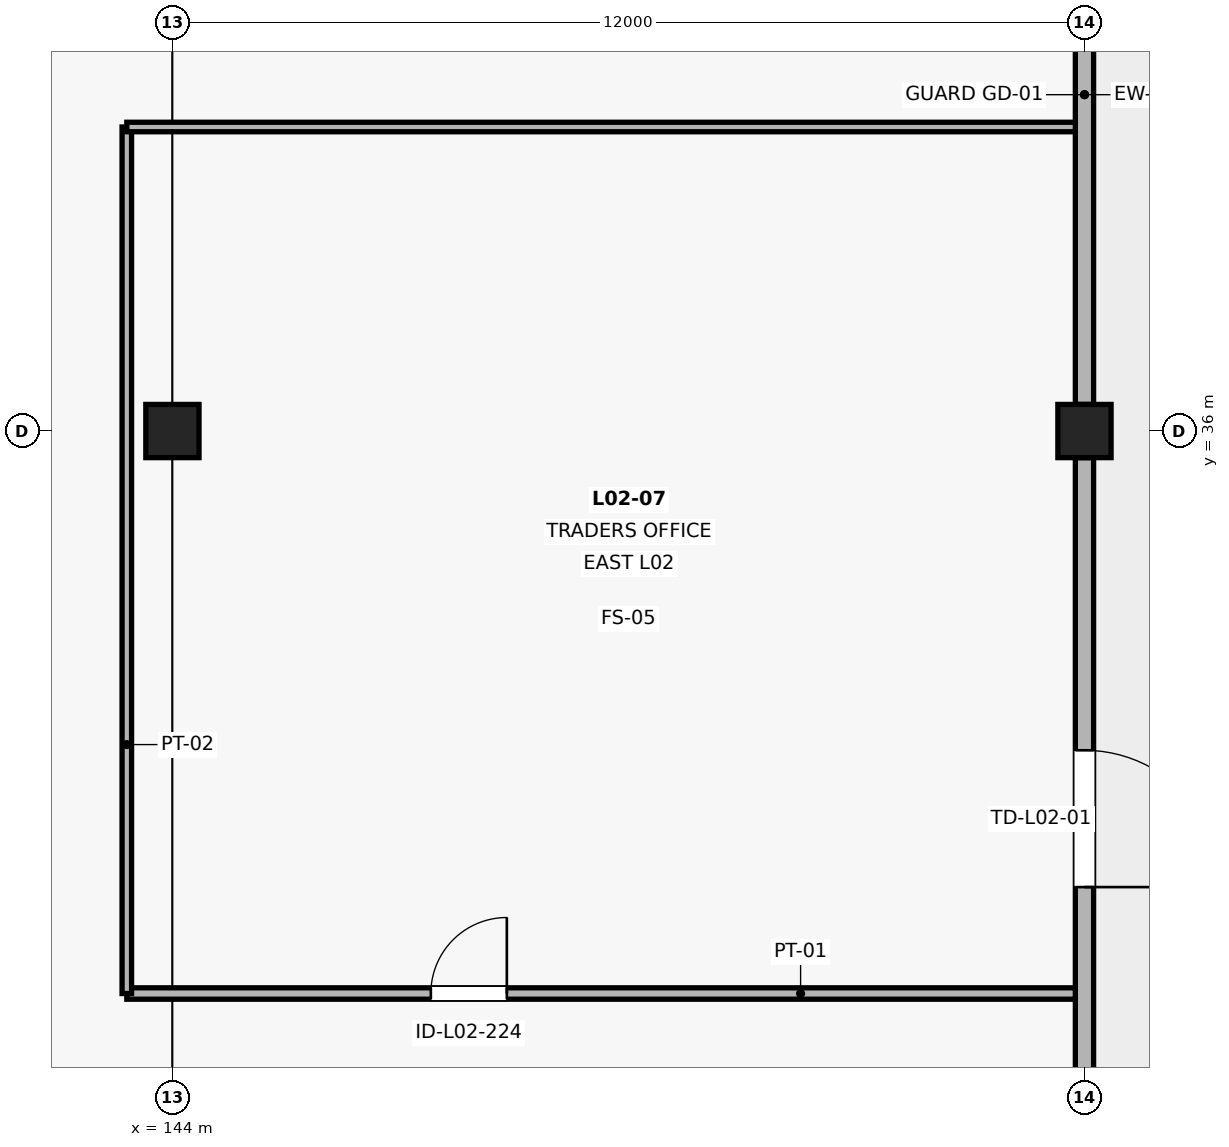
"""IFC4 building model, lengths in metres.
Left out: names, types, materials, properties, quantities, classifications, styles, units other than length and angle.
Written with IfcOpenShell. Run it as: python <this file> out.ifc"""

import sys

from ifc_helpers import new_model, si_unit, direction, frame, frame_2d, origin, origin_2d, place, context, subcontext, project, spatial, rectangle, extrude, element, fill, save


model = new_model("IFC4")
c1 = context("Model", 3, precision=1e-05, world=origin(), true_north=direction((0.0, 1.0)))
c2 = subcontext(c1, "Body", "Model", "MODEL_VIEW")
j1 = project(units=[si_unit("LENGTHUNIT", "METRE"), si_unit("PLANEANGLEUNIT", "RADIAN")], contexts=[c1])
p1 = place(None, origin())
s1 = spatial("IfcSite", under=j1, at=p1, CompositionType="ELEMENT")
p2 = place(p1, origin())
s2 = spatial("IfcBuilding", under=s1, at=p2, CompositionType="ELEMENT")
p3 = place(p2, frame((0.0, 0.0, 11.4)))
s3 = spatial("IfcBuildingStorey", under=s2, at=p3, CompositionType="ELEMENT", Elevation=11.4)
for number, where, z_axis, x_axis in (
    (1, (144.0, 36.0, 0.0), (0.0, 0.0, 1.0), (1.0, 0.0, 0.0)),
    (2, (156.0, 36.0, 0.0), (0.0, 0.0, 1.0), (1.0, 0.0, 0.0)),
):
    element("IfcColumn", number, at=place(p3, frame(where, z_axis=z_axis, x_axis=x_axis)), inside=s3, PredefinedType="COLUMN", context=c2, shape_type="SweptSolid", body=[
        extrude(rectangle(XDim=0.7, YDim=0.7, at=origin_2d()), origin(), (0.0, 0.0, 1.0), 4.8),
    ])
p4 = place(p3, frame((156.0, 35.65, 0.0), z_axis=(0.0, 0.0, 1.0), x_axis=(0.0, -1.0, 0.0)))
e3 = element("IfcWall", 3, at=p4, inside=s3, PredefinedType="SOLIDWALL", context=c2, shape_type="SweptSolid", body=[
    extrude(rectangle(XDim=11.3, YDim=0.24, at=frame_2d((5.65, 0.0))), origin(), (0.0, 0.0, 1.0), 3.458),
])
p5 = place(p4, frame((3.85, 0.0, 0.0)))
e4 = element("IfcOpeningElement", 4, at=p5, cuts=e3, PredefinedType="OPENING", context=c2, shape_type="SweptSolid", body=[
    extrude(rectangle(XDim=1.8, YDim=2.2, at=frame_2d((0.9, 1.1))), frame((0.0, 0.135, 0.0), z_axis=(0.0, -1.0, 0.0), x_axis=(1.0, 0.0, 0.0)), (0.0, 0.0, 1.0), 0.27),
])
p6 = place(p3, frame((156.0, 47.675, 0.0), z_axis=(0.0, 0.0, 1.0), x_axis=(0.0, -1.0, 0.0)))
e5 = element("IfcWall", 5, at=p6, inside=s3, PredefinedType="SOLIDWALL", context=c2, shape_type="SweptSolid", body=[
    extrude(rectangle(XDim=11.325, YDim=0.24, at=frame_2d((5.663, 0.0))), origin(), (0.0, 0.0, 1.0), 3.483),
])
p7 = place(p6, frame((2.075, 0.0, 1.5)))
e6 = element("IfcOpeningElement", 6, at=p7, cuts=e5, PredefinedType="OPENING", context=c2, shape_type="SweptSolid", body=[
    extrude(rectangle(XDim=1.5, YDim=1.4, at=frame_2d((0.75, 0.7))), frame((0.0, 0.135, 0.0), z_axis=(0.0, -1.0, 0.0), x_axis=(1.0, 0.0, 0.0)), (0.0, 0.0, 1.0), 0.27),
])
p8 = place(p3, frame((143.4, 28.6, 0.0), z_axis=(0.0, 0.0, 1.0), x_axis=(1.0, 0.0, 0.0)))
e7 = element("IfcWall", 7, at=p8, inside=s3, PredefinedType="PARTITIONING", context=c2, shape_type="SweptSolid", body=[
    extrude(rectangle(XDim=12.48, YDim=0.15, at=frame_2d((6.24, 0.0))), origin(), (0.0, 0.0, 1.0), 3.463),
])
p9 = place(p8, frame((4.0, 0.0, 0.0)))
e8 = element("IfcOpeningElement", 8, at=p9, cuts=e7, PredefinedType="OPENING", context=c2, shape_type="SweptSolid", body=[
    extrude(rectangle(XDim=1.0, YDim=2.2, at=frame_2d((0.5, 1.1))), frame((0.0, 0.09, 0.0), z_axis=(0.0, -1.0, 0.0), x_axis=(1.0, 0.0, 0.0)), (0.0, 0.0, 1.0), 0.18),
])
p10 = place(p3, frame((143.4, 28.6, 0.0), z_axis=(0.0, 0.0, 1.0), x_axis=(0.0, 1.0, 0.0)))
e9 = element("IfcWall", 9, at=p10, inside=s3, PredefinedType="PARTITIONING", context=c2, shape_type="SweptSolid", body=[
    extrude(rectangle(XDim=11.4, YDim=0.125, at=frame_2d((5.7, 0.0))), origin(), (0.0, 0.0, 1.0), 4.048),
])
p11 = place(p3, frame((143.4, 40.0, 0.0), z_axis=(0.0, 0.0, 1.0), x_axis=(1.0, 0.0, 0.0)))
e10 = element("IfcWall", 10, at=p11, inside=s3, PredefinedType="PARTITIONING", context=c2, shape_type="SweptSolid", body=[
    extrude(rectangle(XDim=12.48, YDim=0.125, at=frame_2d((6.24, 0.0))), origin(), (0.0, 0.0, 1.0), 3.488),
])
p12 = place(p5, origin())
e11 = element("IfcDoor", 11, at=p12, inside=s3, OperationType="SINGLE_SWING_RIGHT", PredefinedType="DOOR", context=c2, shape_type="SweptSolid", body=[
    extrude(rectangle(XDim=1.8, YDim=2.2, at=frame_2d((0.9, 1.1))), frame((0.0, 0.025, 0.0), z_axis=(0.0, -1.0, 0.0), x_axis=(1.0, 0.0, 0.0)), (0.0, 0.0, 1.0), 0.05),
])
fill(e4, e11)
p13 = place(p9, origin())
e12 = element("IfcDoor", 12, at=p13, inside=s3, OperationType="SINGLE_SWING_RIGHT", PredefinedType="DOOR", context=c2, shape_type="SweptSolid", body=[
    extrude(rectangle(XDim=1.0, YDim=2.2, at=frame_2d((0.5, 1.1))), frame((0.0, 0.025, 0.0), z_axis=(0.0, -1.0, 0.0), x_axis=(1.0, 0.0, 0.0)), (0.0, 0.0, 1.0), 0.05),
])
fill(e8, e12)
save(model, sys.argv[1])
